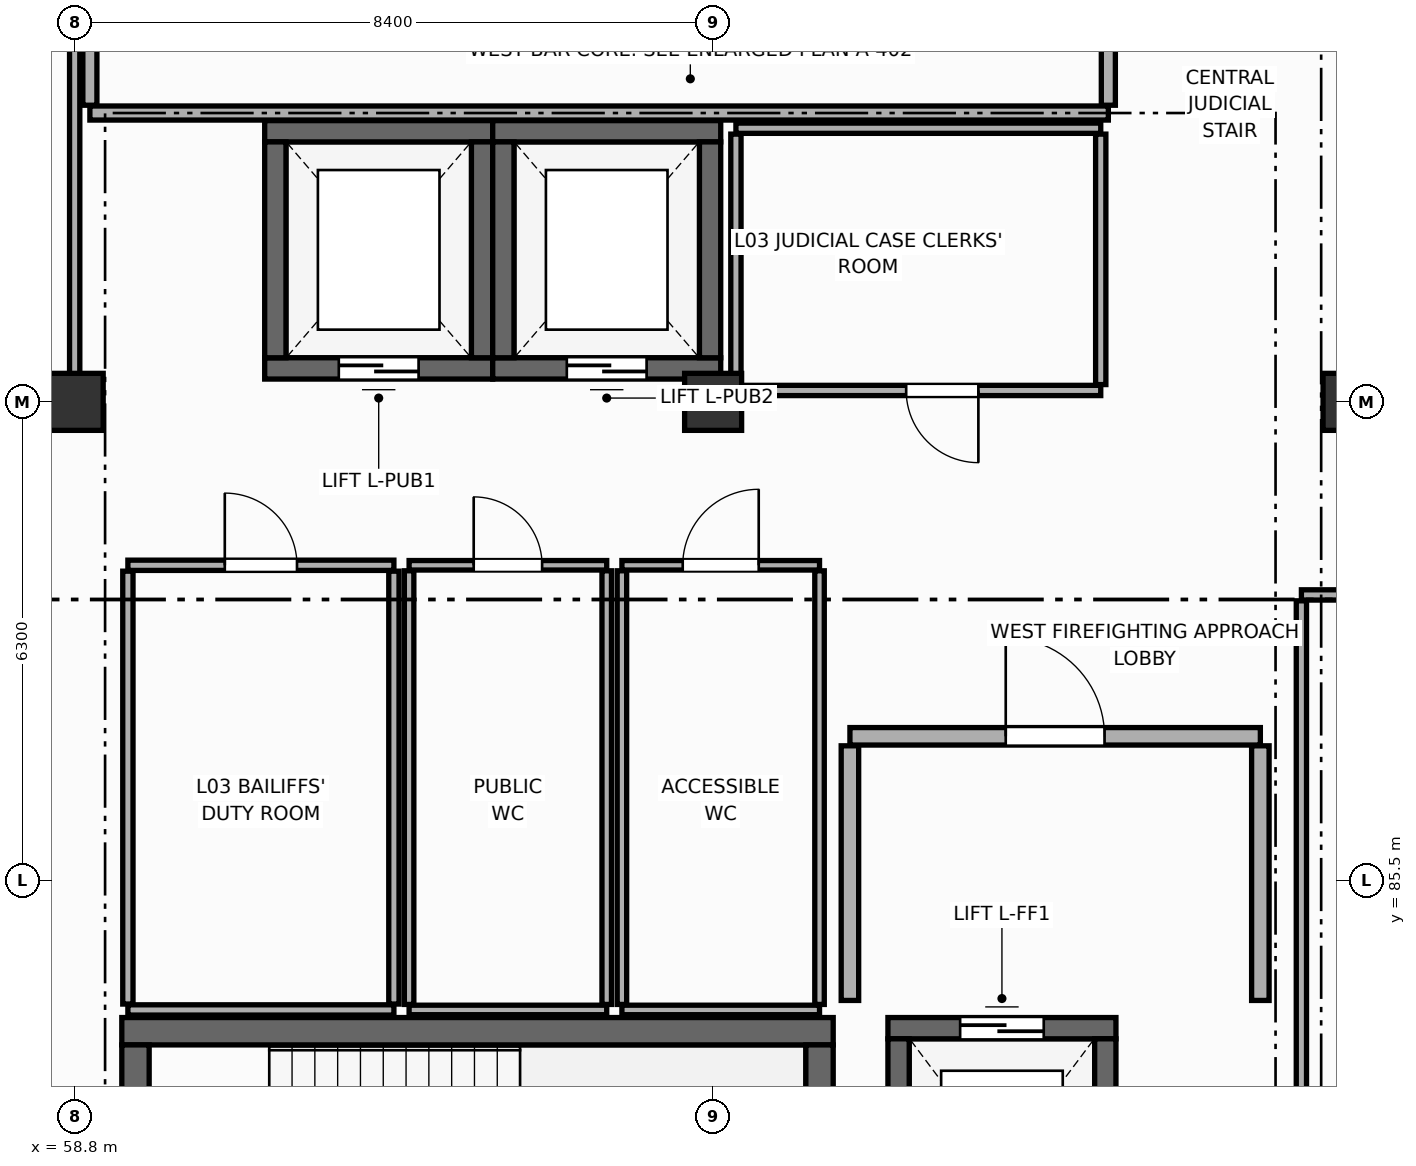
"""IFC4 building model, lengths in metres.
Left out: names, types, materials, properties, quantities, classifications, styles, units other than length and angle.
Written with IfcOpenShell. Run it as: python <this file> out.ifc"""

import sys

from ifc_helpers import new_model, si_unit, direction, frame, frame_2d, origin, origin_2d, place, context, subcontext, project, spatial, rectangle, extrude, element, fill, save


model = new_model("IFC4")
c1 = context("Model", 3, precision=1e-05, world=origin(), true_north=direction((0.0, 1.0)))
c2 = subcontext(c1, "Body", "Model", "MODEL_VIEW")
j1 = project(units=[si_unit("LENGTHUNIT", "METRE"), si_unit("PLANEANGLEUNIT", "RADIAN")], contexts=[c1])
p1 = place(None, origin())
s1 = spatial("IfcSite", under=j1, at=p1, CompositionType="ELEMENT")
p2 = place(p1, origin())
s2 = spatial("IfcBuilding", under=s1, at=p2, CompositionType="ELEMENT")
p3 = place(p2, frame((0.0, 0.0, 9.9)))
s3 = spatial("IfcBuildingStorey", under=s2, at=p3, CompositionType="ELEMENT", Elevation=9.9)
for number, where, z_axis, x_axis in (
    (1, (58.8, 91.8, 0.0), (0.0, 0.0, 1.0), (1.0, 0.0, 0.0)),
    (2, (67.2, 91.8, 0.0), (0.0, 0.0, 1.0), (1.0, 0.0, 0.0)),
    (3, (75.6, 91.8, 0.0), (0.0, 0.0, 1.0), (1.0, 0.0, 0.0)),
):
    element("IfcColumn", number, at=place(p3, frame(where, z_axis=z_axis, x_axis=x_axis)), inside=s3, PredefinedType="COLUMN", context=c2, shape_type="SweptSolid", body=[
        extrude(rectangle(XDim=0.75, YDim=0.75, at=origin_2d()), origin(), (0.0, 0.0, 1.0), 4.5),
    ])
p4 = place(p3, frame((59.42, 83.52, 0.0), z_axis=(0.0, 0.0, 1.0), x_axis=(1.0, 0.0, 0.0)))
e4 = element("IfcWall", 4, at=p4, inside=s3, PredefinedType="SHEAR", context=c2, shape_type="SweptSolid", body=[
    extrude(rectangle(XDim=9.36, YDim=0.36, at=frame_2d((4.68, 0.0))), origin(), (0.0, 0.0, 1.0), 4.25),
])
p5 = place(p3, frame((59.6, 79.98, 0.0), z_axis=(0.0, 0.0, 1.0), x_axis=(0.0, 1.0, 0.0)))
e5 = element("IfcWall", 5, at=p5, inside=s3, PredefinedType="SHEAR", context=c2, shape_type="SweptSolid", body=[
    extrude(rectangle(XDim=3.36, YDim=0.36, at=frame_2d((1.68, 0.0))), origin(), (0.0, 0.0, 1.0), 4.25),
])
p6 = place(p5, frame((1.08, 0.0, 0.0)))
e6 = element("IfcOpeningElement", 6, at=p6, cuts=e5, PredefinedType="OPENING", context=c2, shape_type="SweptSolid", body=[
    extrude(rectangle(XDim=1.2, YDim=2.2, at=frame_2d((0.6, 1.1))), frame((0.0, 0.19, 0.0), z_axis=(0.0, -1.0, 0.0), x_axis=(1.0, 0.0, 0.0)), (0.0, 0.0, 1.0), 0.38),
])
p7 = place(p3, frame((68.6, 83.34, 0.0), z_axis=(0.0, 0.0, 1.0), x_axis=(0.0, -1.0, 0.0)))
e7 = element("IfcWall", 7, at=p7, inside=s3, PredefinedType="SHEAR", context=c2, shape_type="SweptSolid", body=[
    extrude(rectangle(XDim=3.36, YDim=0.36, at=frame_2d((1.68, 0.0))), origin(), (0.0, 0.0, 1.0), 4.25),
])
p8 = place(p3, frame((69.5, 83.56, 0.0), z_axis=(0.0, 0.0, 1.0), x_axis=(1.0, 0.0, 0.0)))
e8 = element("IfcWall", 8, at=p8, inside=s3, PredefinedType="SHEAR", context=c2, shape_type="SweptSolid", body=[
    extrude(rectangle(XDim=3.0, YDim=0.28, at=frame_2d((1.5, 0.0))), origin(), (0.0, 0.0, 1.0), 4.25),
])
p9 = place(p8, frame((0.95, 0.0, 0.0)))
e9 = element("IfcOpeningElement", 9, at=p9, cuts=e8, PredefinedType="OPENING", context=c2, shape_type="SweptSolid", body=[
    extrude(rectangle(XDim=1.1, YDim=2.2, at=frame_2d((0.55, 1.1))), frame((0.0, 0.15, 0.0), z_axis=(0.0, -1.0, 0.0), x_axis=(1.0, 0.0, 0.0)), (0.0, 0.0, 1.0), 0.3),
])
for number, where, z_axis, x_axis in (
    (10, (69.64, 80.18, 0.0), (0.0, 0.0, 1.0), (0.0, 1.0, 0.0)),
    (11, (72.36, 83.42, 0.0), (0.0, 0.0, 1.0), (0.0, -1.0, 0.0)),
):
    element("IfcWall", number, at=place(p3, frame(where, z_axis=z_axis, x_axis=x_axis)), inside=s3, PredefinedType="SHEAR", context=c2, shape_type="SweptSolid", body=[
        extrude(rectangle(XDim=3.24, YDim=0.28, at=frame_2d((1.62, 0.0))), origin(), (0.0, 0.0, 1.0), 4.25),
    ])
p10 = place(p3, frame((61.3, 95.36, 0.0), z_axis=(0.0, 0.0, 1.0), x_axis=(1.0, 0.0, 0.0)))
e12 = element("IfcWall", 12, at=p10, inside=s3, PredefinedType="SHEAR", context=c2, shape_type="SweptSolid", body=[
    extrude(rectangle(XDim=3.0, YDim=0.28, at=frame_2d((1.5, 0.0))), origin(), (0.0, 0.0, 1.0), 4.25),
])
p11 = place(p3, frame((64.3, 92.24, 0.0), z_axis=(0.0, 0.0, 1.0), x_axis=(-1.0, 0.0, 0.0)))
e13 = element("IfcWall", 13, at=p11, inside=s3, PredefinedType="SHEAR", context=c2, shape_type="SweptSolid", body=[
    extrude(rectangle(XDim=3.0, YDim=0.28, at=frame_2d((1.5, 0.0))), origin(), (0.0, 0.0, 1.0), 4.25),
])
p12 = place(p11, frame((0.975, 0.0, 0.0)))
e14 = element("IfcOpeningElement", 14, at=p12, cuts=e13, PredefinedType="OPENING", context=c2, shape_type="SweptSolid", body=[
    extrude(rectangle(XDim=1.05, YDim=2.2, at=frame_2d((0.525, 1.1))), frame((0.0, 0.15, 0.0), z_axis=(0.0, -1.0, 0.0), x_axis=(1.0, 0.0, 0.0)), (0.0, 0.0, 1.0), 0.3),
])
for number, where, z_axis, x_axis in (
    (15, (61.44, 92.38, 0.0), (0.0, 0.0, 1.0), (0.0, 1.0, 0.0)),
    (16, (64.16, 95.22, 0.0), (0.0, 0.0, 1.0), (0.0, -1.0, 0.0)),
):
    element("IfcWall", number, at=place(p3, frame(where, z_axis=z_axis, x_axis=x_axis)), inside=s3, PredefinedType="SHEAR", context=c2, shape_type="SweptSolid", body=[
        extrude(rectangle(XDim=2.84, YDim=0.28, at=frame_2d((1.42, 0.0))), origin(), (0.0, 0.0, 1.0), 4.25),
    ])
p13 = place(p3, frame((64.3, 95.36, 0.0), z_axis=(0.0, 0.0, 1.0), x_axis=(1.0, 0.0, 0.0)))
e17 = element("IfcWall", 17, at=p13, inside=s3, PredefinedType="SHEAR", context=c2, shape_type="SweptSolid", body=[
    extrude(rectangle(XDim=3.0, YDim=0.28, at=frame_2d((1.5, 0.0))), origin(), (0.0, 0.0, 1.0), 4.25),
])
p14 = place(p3, frame((67.3, 92.24, 0.0), z_axis=(0.0, 0.0, 1.0), x_axis=(-1.0, 0.0, 0.0)))
e18 = element("IfcWall", 18, at=p14, inside=s3, PredefinedType="SHEAR", context=c2, shape_type="SweptSolid", body=[
    extrude(rectangle(XDim=3.0, YDim=0.28, at=frame_2d((1.5, 0.0))), origin(), (0.0, 0.0, 1.0), 4.25),
])
p15 = place(p14, frame((0.975, 0.0, 0.0)))
e19 = element("IfcOpeningElement", 19, at=p15, cuts=e18, PredefinedType="OPENING", context=c2, shape_type="SweptSolid", body=[
    extrude(rectangle(XDim=1.05, YDim=2.2, at=frame_2d((0.525, 1.1))), frame((0.0, 0.15, 0.0), z_axis=(0.0, -1.0, 0.0), x_axis=(1.0, 0.0, 0.0)), (0.0, 0.0, 1.0), 0.3),
])
for number, where, z_axis, x_axis in (
    (20, (64.44, 92.38, 0.0), (0.0, 0.0, 1.0), (0.0, 1.0, 0.0)),
    (21, (67.16, 95.22, 0.0), (0.0, 0.0, 1.0), (0.0, -1.0, 0.0)),
):
    element("IfcWall", number, at=place(p3, frame(where, z_axis=z_axis, x_axis=x_axis)), inside=s3, PredefinedType="SHEAR", context=c2, shape_type="SweptSolid", body=[
        extrude(rectangle(XDim=2.84, YDim=0.28, at=frame_2d((1.42, 0.0))), origin(), (0.0, 0.0, 1.0), 4.25),
    ])
p16 = place(p3, frame((69.0, 87.4, 0.0), z_axis=(0.0, 0.0, 1.0), x_axis=(1.0, 0.0, 0.0)))
e22 = element("IfcWall", 22, at=p16, inside=s3, PredefinedType="STANDARD", context=c2, shape_type="SweptSolid", body=[
    extrude(rectangle(XDim=5.4, YDim=0.23, at=frame_2d((2.7, 0.0))), origin(), (0.0, 0.0, 1.0), 4.235),
])
p17 = place(p16, frame((2.05, 0.0, 0.0)))
e23 = element("IfcOpeningElement", 23, at=p17, cuts=e22, PredefinedType="OPENING", context=c2, shape_type="SweptSolid", body=[
    extrude(rectangle(XDim=1.3, YDim=2.2, at=frame_2d((0.65, 1.1))), frame((0.0, 0.125, 0.0), z_axis=(0.0, -1.0, 0.0), x_axis=(1.0, 0.0, 0.0)), (0.0, 0.0, 1.0), 0.25),
])
for number, where, z_axis, x_axis in (
    (24, (69.0, 83.925, 0.0), (0.0, 0.0, 1.0), (0.0, 1.0, 0.0)),
    (25, (74.4, 87.275, 0.0), (0.0, 0.0, 1.0), (0.0, -1.0, 0.0)),
):
    element("IfcWall", number, at=place(p3, frame(where, z_axis=z_axis, x_axis=x_axis)), inside=s3, PredefinedType="STANDARD", context=c2, shape_type="SweptSolid", body=[
        extrude(rectangle(XDim=3.35, YDim=0.23, at=frame_2d((1.675, 0.0))), origin(), (0.0, 0.0, 1.0), 4.235),
    ])
p18 = place(p3, frame((63.2, 89.65, 0.0), z_axis=(0.0, 0.0, 1.0), x_axis=(1.0, 0.0, 0.0)))
e26 = element("IfcWall", 26, at=p18, inside=s3, PredefinedType="PARTITIONING", context=c2, shape_type="SweptSolid", body=[
    extrude(rectangle(XDim=2.6, YDim=0.125, at=frame_2d((1.3, 0.0))), origin(), (0.0, 0.0, 1.0), 4.235),
])
p19 = place(p18, frame((0.85, 0.0, 0.0)))
e27 = element("IfcOpeningElement", 27, at=p19, cuts=e26, PredefinedType="OPENING", context=c2, shape_type="SweptSolid", body=[
    extrude(rectangle(XDim=0.9, YDim=2.1, at=frame_2d((0.45, 1.05))), frame((0.0, 0.073, 0.0), z_axis=(0.0, -1.0, 0.0), x_axis=(1.0, 0.0, 0.0)), (0.0, 0.0, 1.0), 0.145),
])
p20 = place(p3, frame((65.8, 83.8, 0.0), z_axis=(0.0, 0.0, 1.0), x_axis=(-1.0, 0.0, 0.0)))
e28 = element("IfcWall", 28, at=p20, inside=s3, PredefinedType="PARTITIONING", context=c2, shape_type="SweptSolid", body=[
    extrude(rectangle(XDim=2.6, YDim=0.125, at=frame_2d((1.3, 0.0))), origin(), (0.0, 0.0, 1.0), 4.235),
])
for number, where, z_axis, x_axis in (
    (29, (63.2, 83.873, 0.0), (0.0, 0.0, 1.0), (0.0, 1.0, 0.0)),
    (30, (65.8, 89.577, 0.0), (0.0, 0.0, 1.0), (0.0, -1.0, 0.0)),
):
    element("IfcWall", number, at=place(p3, frame(where, z_axis=z_axis, x_axis=x_axis)), inside=s3, PredefinedType="PARTITIONING", context=c2, shape_type="SweptSolid", body=[
        extrude(rectangle(XDim=5.705, YDim=0.125, at=frame_2d((2.853, 0.0))), origin(), (0.0, 0.0, 1.0), 4.235),
    ])
p21 = place(p3, frame((66.0, 89.65, 0.0), z_axis=(0.0, 0.0, 1.0), x_axis=(1.0, 0.0, 0.0)))
e31 = element("IfcWall", 31, at=p21, inside=s3, PredefinedType="PARTITIONING", context=c2, shape_type="SweptSolid", body=[
    extrude(rectangle(XDim=2.6, YDim=0.125, at=frame_2d((1.3, 0.0))), origin(), (0.0, 0.0, 1.0), 3.38),
])
p22 = place(p21, frame((0.8, 0.0, 0.0)))
e32 = element("IfcOpeningElement", 32, at=p22, cuts=e31, PredefinedType="OPENING", context=c2, shape_type="SweptSolid", body=[
    extrude(rectangle(XDim=1.0, YDim=2.1, at=frame_2d((0.5, 1.05))), frame((0.0, 0.073, 0.0), z_axis=(0.0, -1.0, 0.0), x_axis=(1.0, 0.0, 0.0)), (0.0, 0.0, 1.0), 0.145),
])
p23 = place(p3, frame((68.6, 83.8, 0.0), z_axis=(0.0, 0.0, 1.0), x_axis=(-1.0, 0.0, 0.0)))
e33 = element("IfcWall", 33, at=p23, inside=s3, PredefinedType="PARTITIONING", context=c2, shape_type="SweptSolid", body=[
    extrude(rectangle(XDim=2.6, YDim=0.125, at=frame_2d((1.3, 0.0))), origin(), (0.0, 0.0, 1.0), 3.38),
])
for number, where, z_axis, x_axis in (
    (34, (66.0, 83.873, 0.0), (0.0, 0.0, 1.0), (0.0, 1.0, 0.0)),
    (35, (68.6, 89.577, 0.0), (0.0, 0.0, 1.0), (0.0, -1.0, 0.0)),
):
    element("IfcWall", number, at=place(p3, frame(where, z_axis=z_axis, x_axis=x_axis)), inside=s3, PredefinedType="PARTITIONING", context=c2, shape_type="SweptSolid", body=[
        extrude(rectangle(XDim=5.705, YDim=0.125, at=frame_2d((2.853, 0.0))), origin(), (0.0, 0.0, 1.0), 4.235),
    ])
p24 = place(p3, frame((59.5, 89.65, 0.0), z_axis=(0.0, 0.0, 1.0), x_axis=(1.0, 0.0, 0.0)))
e36 = element("IfcWall", 36, at=p24, inside=s3, PredefinedType="PARTITIONING", context=c2, shape_type="SweptSolid", body=[
    extrude(rectangle(XDim=3.5, YDim=0.135, at=frame_2d((1.75, 0.0))), origin(), (0.0, 0.0, 1.0), 4.235),
])
p25 = place(p24, frame((1.275, 0.0, 0.0)))
e37 = element("IfcOpeningElement", 37, at=p25, cuts=e36, PredefinedType="OPENING", context=c2, shape_type="SweptSolid", body=[
    extrude(rectangle(XDim=0.95, YDim=2.15, at=frame_2d((0.475, 1.075))), frame((0.0, 0.077, 0.0), z_axis=(0.0, -1.0, 0.0), x_axis=(1.0, 0.0, 0.0)), (0.0, 0.0, 1.0), 0.155),
])
p26 = place(p3, frame((63.0, 83.8, 0.0), z_axis=(0.0, 0.0, 1.0), x_axis=(-1.0, 0.0, 0.0)))
e38 = element("IfcWall", 38, at=p26, inside=s3, PredefinedType="PARTITIONING", context=c2, shape_type="SweptSolid", body=[
    extrude(rectangle(XDim=3.5, YDim=0.135, at=frame_2d((1.75, 0.0))), origin(), (0.0, 0.0, 1.0), 4.235),
])
for number, where, z_axis, x_axis in (
    (39, (59.5, 83.877, 0.0), (0.0, 0.0, 1.0), (0.0, 1.0, 0.0)),
    (40, (63.0, 89.573, 0.0), (0.0, 0.0, 1.0), (0.0, -1.0, 0.0)),
):
    element("IfcWall", number, at=place(p3, frame(where, z_axis=z_axis, x_axis=x_axis)), inside=s3, PredefinedType="PARTITIONING", context=c2, shape_type="SweptSolid", body=[
        extrude(rectangle(XDim=5.695, YDim=0.135, at=frame_2d((2.848, 0.0))), origin(), (0.0, 0.0, 1.0), 4.235),
    ])
p27 = place(p3, frame((72.4, 95.6, 0.0), z_axis=(0.0, 0.0, 1.0), x_axis=(-1.0, 0.0, 0.0)))
e41 = element("IfcWall", 41, at=p27, inside=s3, PredefinedType="PARTITIONING", context=c2, shape_type="SweptSolid", body=[
    extrude(rectangle(XDim=13.4, YDim=0.185, at=frame_2d((6.7, 0.0))), origin(), (0.0, 0.0, 1.0), 3.38),
])
p28 = place(p3, frame((59.0, 95.702, 0.0), z_axis=(0.0, 0.0, 1.0), x_axis=(0.0, 1.0, 0.0)))
e42 = element("IfcWall", 42, at=p28, inside=s3, PredefinedType="PARTITIONING", context=c2, shape_type="SweptSolid", body=[
    extrude(rectangle(XDim=7.795, YDim=0.185, at=frame_2d((3.897, 0.0))), origin(), (0.0, 0.0, 1.0), 3.38),
])
p29 = place(p3, frame((72.4, 103.498, 0.0), z_axis=(0.0, 0.0, 1.0), x_axis=(0.0, -1.0, 0.0)))
e43 = element("IfcWall", 43, at=p29, inside=s3, PredefinedType="PARTITIONING", context=c2, shape_type="SweptSolid", body=[
    extrude(rectangle(XDim=7.795, YDim=0.185, at=frame_2d((3.897, 0.0))), origin(), (0.0, 0.0, 1.0), 3.63),
])
p30 = place(p29, frame((2.133, 0.0, 0.0)))
e44 = element("IfcOpeningElement", 44, at=p30, cuts=e43, PredefinedType="OPENING", context=c2, shape_type="SweptSolid", body=[
    extrude(rectangle(XDim=2.0, YDim=2.5, at=frame_2d((1.0, 1.25))), frame((0.0, 0.103, 0.0), z_axis=(0.0, -1.0, 0.0), x_axis=(1.0, 0.0, 0.0)), (0.0, 0.0, 1.0), 0.205),
])
p31 = place(p3, frame((67.5, 95.4, 0.0), z_axis=(0.0, 0.0, 1.0), x_axis=(1.0, 0.0, 0.0)))
e45 = element("IfcWall", 45, at=p31, inside=s3, PredefinedType="PARTITIONING", context=c2, shape_type="SweptSolid", body=[
    extrude(rectangle(XDim=4.8, YDim=0.135, at=frame_2d((2.4, 0.0))), origin(), (0.0, 0.0, 1.0), 3.38),
])
p32 = place(p3, frame((72.3, 91.95, 0.0), z_axis=(0.0, 0.0, 1.0), x_axis=(-1.0, 0.0, 0.0)))
e46 = element("IfcWall", 46, at=p32, inside=s3, PredefinedType="PARTITIONING", context=c2, shape_type="SweptSolid", body=[
    extrude(rectangle(XDim=4.8, YDim=0.135, at=frame_2d((2.4, 0.0))), origin(), (0.0, 0.0, 1.0), 3.38),
])
p33 = place(p32, frame((1.61, 0.0, 0.0)))
e47 = element("IfcOpeningElement", 47, at=p33, cuts=e46, PredefinedType="OPENING", context=c2, shape_type="SweptSolid", body=[
    extrude(rectangle(XDim=0.95, YDim=2.15, at=frame_2d((0.475, 1.075))), frame((0.0, 0.077, 0.0), z_axis=(0.0, -1.0, 0.0), x_axis=(1.0, 0.0, 0.0)), (0.0, 0.0, 1.0), 0.155),
])
p34 = place(p3, frame((67.5, 92.028, 0.0), z_axis=(0.0, 0.0, 1.0), x_axis=(0.0, 1.0, 0.0)))
e48 = element("IfcWall", 48, at=p34, inside=s3, PredefinedType="PARTITIONING", context=c2, shape_type="SweptSolid", body=[
    extrude(rectangle(XDim=3.295, YDim=0.135, at=frame_2d((1.647, 0.0))), origin(), (0.0, 0.0, 1.0), 3.38),
])
p35 = place(p3, frame((72.3, 95.323, 0.0), z_axis=(0.0, 0.0, 1.0), x_axis=(0.0, -1.0, 0.0)))
e49 = element("IfcWall", 49, at=p35, inside=s3, PredefinedType="PARTITIONING", context=c2, shape_type="SweptSolid", body=[
    extrude(rectangle(XDim=3.295, YDim=0.135, at=frame_2d((1.647, 0.0))), origin(), (0.0, 0.0, 1.0), 3.68),
])
p36 = place(p3, frame((74.94, 89.26, 0.0), z_axis=(0.0, 0.0, 1.0), x_axis=(1.0, 0.0, 0.0)))
e50 = element("IfcWall", 50, at=p36, inside=s3, PredefinedType="PARTITIONING", context=c2, shape_type="SweptSolid", body=[
    extrude(rectangle(XDim=5.434, YDim=0.135, at=frame_2d((2.717, 0.0))), origin(), (0.0, 0.0, 1.0), 3.38),
])
p37 = place(p36, frame((2.053, 0.0, 0.0)))
e51 = element("IfcOpeningElement", 51, at=p37, cuts=e50, PredefinedType="OPENING", context=c2, shape_type="SweptSolid", body=[
    extrude(rectangle(XDim=0.95, YDim=2.15, at=frame_2d((0.475, 1.075))), frame((0.0, 0.077, 0.0), z_axis=(0.0, -1.0, 0.0), x_axis=(1.0, 0.0, 0.0)), (0.0, 0.0, 1.0), 0.155),
])
p38 = place(p3, frame((74.94, 79.817, 0.0), z_axis=(0.0, 0.0, 1.0), x_axis=(0.0, 1.0, 0.0)))
e52 = element("IfcWall", 52, at=p38, inside=s3, PredefinedType="PARTITIONING", context=c2, shape_type="SweptSolid", body=[
    extrude(rectangle(XDim=9.365, YDim=0.135, at=frame_2d((4.683, 0.0))), origin(), (0.0, 0.0, 1.0), 4.235),
])
p39 = place(p3, frame((58.8, 91.95, 0.0), z_axis=(0.0, 0.0, 1.0), x_axis=(-1.0, 0.0, 0.0)))
e53 = element("IfcWall", 53, at=p39, inside=s3, PredefinedType="PARTITIONING", context=c2, shape_type="SweptSolid", body=[
    extrude(rectangle(XDim=9.5, YDim=0.135, at=frame_2d((4.75, 0.0))), origin(), (0.0, 0.0, 1.0), 3.28),
])
p40 = place(p39, frame((3.073, 0.0, 0.0)))
e54 = element("IfcOpeningElement", 54, at=p40, cuts=e53, PredefinedType="OPENING", context=c2, shape_type="SweptSolid", body=[
    extrude(rectangle(XDim=1.02, YDim=2.15, at=frame_2d((0.51, 1.075))), frame((0.0, 0.077, 0.0), z_axis=(0.0, -1.0, 0.0), x_axis=(1.0, 0.0, 0.0)), (0.0, 0.0, 1.0), 0.155),
])
p41 = place(p3, frame((58.8, 99.423, 0.0), z_axis=(0.0, 0.0, 1.0), x_axis=(0.0, -1.0, 0.0)))
e55 = element("IfcWall", 55, at=p41, inside=s3, PredefinedType="PARTITIONING", context=c2, shape_type="SweptSolid", body=[
    extrude(rectangle(XDim=7.395, YDim=0.135, at=frame_2d((3.698, 0.0))), origin(), (0.0, 0.0, 1.0), 3.38),
])
p42 = place(p9, origin())
e56 = element("IfcDoor", 56, at=p42, inside=s3, OperationType="DOUBLE_DOOR_SLIDING", PredefinedType="DOOR", context=c2, shape_type="SweptSolid", body=[
    extrude(rectangle(XDim=1.1, YDim=2.2, at=frame_2d((0.55, 1.1))), frame((0.0, 0.025, 0.0), z_axis=(0.0, -1.0, 0.0), x_axis=(1.0, 0.0, 0.0)), (0.0, 0.0, 1.0), 0.05),
])
fill(e9, e56)
p43 = place(p12, origin())
e57 = element("IfcDoor", 57, at=p43, inside=s3, OperationType="DOUBLE_DOOR_SLIDING", PredefinedType="DOOR", context=c2, shape_type="SweptSolid", body=[
    extrude(rectangle(XDim=1.05, YDim=2.2, at=frame_2d((0.525, 1.1))), frame((0.0, 0.025, 0.0), z_axis=(0.0, -1.0, 0.0), x_axis=(1.0, 0.0, 0.0)), (0.0, 0.0, 1.0), 0.05),
])
fill(e14, e57)
p44 = place(p15, origin())
e58 = element("IfcDoor", 58, at=p44, inside=s3, OperationType="DOUBLE_DOOR_SLIDING", PredefinedType="DOOR", context=c2, shape_type="SweptSolid", body=[
    extrude(rectangle(XDim=1.05, YDim=2.2, at=frame_2d((0.525, 1.1))), frame((0.0, 0.025, 0.0), z_axis=(0.0, -1.0, 0.0), x_axis=(1.0, 0.0, 0.0)), (0.0, 0.0, 1.0), 0.05),
])
fill(e19, e58)
p45 = place(p17, origin())
e59 = element("IfcDoor", 59, at=p45, inside=s3, OperationType="SINGLE_SWING_LEFT", PredefinedType="DOOR", context=c2, shape_type="SweptSolid", body=[
    extrude(rectangle(XDim=1.3, YDim=2.2, at=frame_2d((0.65, 1.1))), frame((0.0, 0.025, 0.0), z_axis=(0.0, -1.0, 0.0), x_axis=(1.0, 0.0, 0.0)), (0.0, 0.0, 1.0), 0.05),
])
fill(e23, e59)
p46 = place(p19, origin())
e60 = element("IfcDoor", 60, at=p46, inside=s3, OperationType="SINGLE_SWING_LEFT", PredefinedType="DOOR", context=c2, shape_type="SweptSolid", body=[
    extrude(rectangle(XDim=0.9, YDim=2.1, at=frame_2d((0.45, 1.05))), frame((0.0, 0.025, 0.0), z_axis=(0.0, -1.0, 0.0), x_axis=(1.0, 0.0, 0.0)), (0.0, 0.0, 1.0), 0.05),
])
fill(e27, e60)
p47 = place(p22, origin())
e61 = element("IfcDoor", 61, at=p47, inside=s3, OperationType="SINGLE_SWING_RIGHT", PredefinedType="DOOR", context=c2, shape_type="SweptSolid", body=[
    extrude(rectangle(XDim=1.0, YDim=2.1, at=frame_2d((0.5, 1.05))), frame((0.0, 0.025, 0.0), z_axis=(0.0, -1.0, 0.0), x_axis=(1.0, 0.0, 0.0)), (0.0, 0.0, 1.0), 0.05),
])
fill(e32, e61)
p48 = place(p25, origin())
e62 = element("IfcDoor", 62, at=p48, inside=s3, OperationType="SINGLE_SWING_LEFT", PredefinedType="DOOR", context=c2, shape_type="SweptSolid", body=[
    extrude(rectangle(XDim=0.95, YDim=2.15, at=frame_2d((0.475, 1.075))), frame((0.0, 0.025, 0.0), z_axis=(0.0, -1.0, 0.0), x_axis=(1.0, 0.0, 0.0)), (0.0, 0.0, 1.0), 0.05),
])
fill(e37, e62)
p49 = place(p33, origin())
e63 = element("IfcDoor", 63, at=p49, inside=s3, OperationType="SINGLE_SWING_LEFT", PredefinedType="DOOR", context=c2, shape_type="SweptSolid", body=[
    extrude(rectangle(XDim=0.95, YDim=2.15, at=frame_2d((0.475, 1.075))), frame((0.0, 0.025, 0.0), z_axis=(0.0, -1.0, 0.0), x_axis=(1.0, 0.0, 0.0)), (0.0, 0.0, 1.0), 0.05),
])
fill(e47, e63)
save(model, sys.argv[1])
